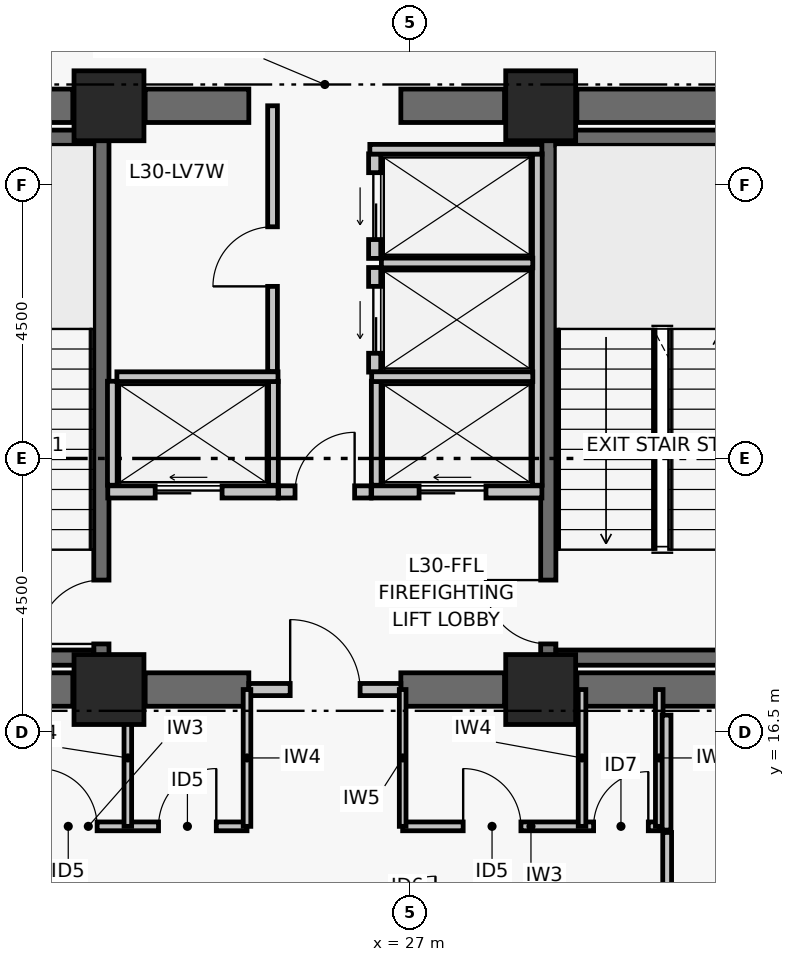
"""IFC4 building model, lengths in metres.
Left out: names, types, materials, properties, quantities, classifications, styles, units other than length and angle.
Written with IfcOpenShell. Run it as: python <this file> out.ifc"""

import sys

from ifc_helpers import new_model, si_unit, direction, frame, frame_2d, origin, origin_2d, place, context, subcontext, project, spatial, rectangle, extrude, element, fill, save


model = new_model("IFC4")
c1 = context("Model", 3, precision=1e-05, world=origin(), true_north=direction((0.0, 1.0)))
c2 = subcontext(c1, "Body", "Model", "MODEL_VIEW")
j1 = project(units=[si_unit("LENGTHUNIT", "METRE"), si_unit("PLANEANGLEUNIT", "RADIAN")], contexts=[c1])
p1 = place(None, origin())
s1 = spatial("IfcSite", under=j1, at=p1, CompositionType="ELEMENT")
p2 = place(p1, origin())
s2 = spatial("IfcBuilding", under=s1, at=p2, CompositionType="ELEMENT")
p3 = place(p2, frame((0.0, 0.0, 122.58)))
s3 = spatial("IfcBuildingStorey", under=s2, at=p3, CompositionType="ELEMENT", Elevation=122.58)
for number, where, z_axis, x_axis in (
    (1, (22.05, 17.2, 0.0), (0.0, 0.0, 1.0), (1.0, 0.0, 0.0)),
    (2, (29.15, 17.2, 0.0), (0.0, 0.0, 1.0), (1.0, 0.0, 0.0)),
    (3, (22.05, 26.8, 0.0), (0.0, 0.0, 1.0), (1.0, 0.0, 0.0)),
    (4, (29.15, 26.8, 0.0), (0.0, 0.0, 1.0), (1.0, 0.0, 0.0)),
):
    element("IfcColumn", number, at=place(p3, frame(where, z_axis=z_axis, x_axis=x_axis)), inside=s3, PredefinedType="COLUMN", context=c2, shape_type="SweptSolid", body=[
        extrude(rectangle(XDim=1.15, YDim=1.15, at=origin_2d()), origin(), (0.0, 0.0, 1.0), 3.72),
    ])
p4 = place(p3, frame((18.395, 17.2, 0.0), z_axis=(0.0, 0.0, 1.0), x_axis=(1.0, 0.0, 0.0)))
e5 = element("IfcWall", 5, at=p4, inside=s3, PredefinedType="SHEAR", context=c2, shape_type="SweptSolid", body=[
    extrude(rectangle(XDim=3.06, YDim=0.55, at=frame_2d((1.53, 0.0))), origin(), (0.0, 0.0, 1.0), 3.47),
])
p5 = place(p3, frame((22.645, 17.2, 0.0), z_axis=(0.0, 0.0, 1.0), x_axis=(1.0, 0.0, 0.0)))
e6 = element("IfcWall", 6, at=p5, inside=s3, PredefinedType="SHEAR", context=c2, shape_type="SweptSolid", body=[
    extrude(rectangle(XDim=1.705, YDim=0.55, at=frame_2d((0.853, 0.0))), origin(), (0.0, 0.0, 1.0), 3.47),
])
p6 = place(p3, frame((26.85, 17.2, 0.0), z_axis=(0.0, 0.0, 1.0), x_axis=(1.0, 0.0, 0.0)))
e7 = element("IfcWall", 7, at=p6, inside=s3, PredefinedType="SHEAR", context=c2, shape_type="SweptSolid", body=[
    extrude(rectangle(XDim=1.705, YDim=0.55, at=frame_2d((0.853, 0.0))), origin(), (0.0, 0.0, 1.0), 3.47),
])
p7 = place(p3, frame((29.745, 17.2, 0.0), z_axis=(0.0, 0.0, 1.0), x_axis=(1.0, 0.0, 0.0)))
e8 = element("IfcWall", 8, at=p7, inside=s3, PredefinedType="SHEAR", context=c2, shape_type="SweptSolid", body=[
    extrude(rectangle(XDim=3.06, YDim=0.55, at=frame_2d((1.53, 0.0))), origin(), (0.0, 0.0, 1.0), 3.47),
])
p8 = place(p3, frame((18.395, 26.8, 0.0), z_axis=(0.0, 0.0, 1.0), x_axis=(1.0, 0.0, 0.0)))
e9 = element("IfcWall", 9, at=p8, inside=s3, PredefinedType="SHEAR", context=c2, shape_type="SweptSolid", body=[
    extrude(rectangle(XDim=3.06, YDim=0.55, at=frame_2d((1.53, 0.0))), origin(), (0.0, 0.0, 1.0), 3.47),
])
p9 = place(p3, frame((22.645, 26.8, 0.0), z_axis=(0.0, 0.0, 1.0), x_axis=(1.0, 0.0, 0.0)))
e10 = element("IfcWall", 10, at=p9, inside=s3, PredefinedType="SHEAR", context=c2, shape_type="SweptSolid", body=[
    extrude(rectangle(XDim=1.705, YDim=0.55, at=frame_2d((0.853, 0.0))), origin(), (0.0, 0.0, 1.0), 3.47),
])
p10 = place(p3, frame((26.85, 26.8, 0.0), z_axis=(0.0, 0.0, 1.0), x_axis=(1.0, 0.0, 0.0)))
e11 = element("IfcWall", 11, at=p10, inside=s3, PredefinedType="SHEAR", context=c2, shape_type="SweptSolid", body=[
    extrude(rectangle(XDim=1.705, YDim=0.55, at=frame_2d((0.853, 0.0))), origin(), (0.0, 0.0, 1.0), 3.47),
])
p11 = place(p3, frame((29.745, 26.8, 0.0), z_axis=(0.0, 0.0, 1.0), x_axis=(1.0, 0.0, 0.0)))
e12 = element("IfcWall", 12, at=p11, inside=s3, PredefinedType="SHEAR", context=c2, shape_type="SweptSolid", body=[
    extrude(rectangle(XDim=3.06, YDim=0.55, at=frame_2d((1.53, 0.0))), origin(), (0.0, 0.0, 1.0), 3.47),
])
p12 = place(p3, frame((21.925, 17.6, 0.0), z_axis=(0.0, 0.0, 1.0), x_axis=(0.0, 1.0, 0.0)))
e13 = element("IfcWall", 13, at=p12, inside=s3, PredefinedType="SHEAR", context=c2, shape_type="SweptSolid", body=[
    extrude(rectangle(XDim=8.8, YDim=0.25, at=frame_2d((4.4, 0.0))), origin(), (0.0, 0.0, 1.0), 3.47),
])
p13 = place(p12, frame((0.35, 0.0, 0.0)))
e14 = element("IfcOpeningElement", 14, at=p13, cuts=e13, PredefinedType="OPENING", context=c2, shape_type="SweptSolid", body=[
    extrude(rectangle(XDim=1.05, YDim=2.08, at=frame_2d((0.525, 1.04))), frame((0.0, 0.135, 0.0), z_axis=(0.0, -1.0, 0.0), x_axis=(1.0, 0.0, 0.0)), (0.0, 0.0, 1.0), 0.27),
])
for number, where, z_axis, x_axis in (
    (15, (18.329, 17.725, 0.0), (0.0, 0.0, 1.0), (1.0, 0.0, 0.0)),
    (16, (18.329, 26.275, 0.0), (0.0, 0.0, 1.0), (1.0, 0.0, 0.0)),
):
    element("IfcWall", number, at=place(p3, frame(where, z_axis=z_axis, x_axis=x_axis)), inside=s3, PredefinedType="SHEAR", context=c2, shape_type="SweptSolid", body=[
        extrude(rectangle(XDim=3.471, YDim=0.25, at=frame_2d((1.735, 0.0))), origin(), (0.0, 0.0, 1.0), 3.47),
    ])
p14 = place(p3, frame((29.275, 17.6, 0.0), z_axis=(0.0, 0.0, 1.0), x_axis=(0.0, 1.0, 0.0)))
e17 = element("IfcWall", 17, at=p14, inside=s3, PredefinedType="SHEAR", context=c2, shape_type="SweptSolid", body=[
    extrude(rectangle(XDim=8.8, YDim=0.25, at=frame_2d((4.4, 0.0))), origin(), (0.0, 0.0, 1.0), 3.47),
])
p15 = place(p14, frame((0.35, 0.0, 0.0)))
e18 = element("IfcOpeningElement", 18, at=p15, cuts=e17, PredefinedType="OPENING", context=c2, shape_type="SweptSolid", body=[
    extrude(rectangle(XDim=1.05, YDim=2.08, at=frame_2d((0.525, 1.04))), frame((0.0, 0.135, 0.0), z_axis=(0.0, -1.0, 0.0), x_axis=(1.0, 0.0, 0.0)), (0.0, 0.0, 1.0), 0.27),
])
for number, where, z_axis, x_axis in (
    (19, (29.4, 17.725, 0.0), (0.0, 0.0, 1.0), (1.0, 0.0, 0.0)),
    (20, (29.4, 26.275, 0.0), (0.0, 0.0, 1.0), (1.0, 0.0, 0.0)),
):
    element("IfcWall", number, at=place(p3, frame(where, z_axis=z_axis, x_axis=x_axis)), inside=s3, PredefinedType="SHEAR", context=c2, shape_type="SweptSolid", body=[
        extrude(rectangle(XDim=3.471, YDim=0.25, at=frame_2d((1.736, 0.0))), origin(), (0.0, 0.0, 1.0), 3.47),
    ])
p16 = place(p3, frame((24.35, 17.2, 0.0), z_axis=(0.0, 0.0, 1.0), x_axis=(1.0, 0.0, 0.0)))
e21 = element("IfcWall", 21, at=p16, inside=s3, PredefinedType="PARTITIONING", context=c2, shape_type="SweptSolid", body=[
    extrude(rectangle(XDim=2.5, YDim=0.2, at=frame_2d((1.25, 0.0))), origin(), (0.0, 0.0, 1.0), 2.6),
])
p17 = place(p16, frame((0.68, 0.0, 0.0)))
e22 = element("IfcOpeningElement", 22, at=p17, cuts=e21, PredefinedType="OPENING", context=c2, shape_type="SweptSolid", body=[
    extrude(rectangle(XDim=1.15, YDim=2.08, at=frame_2d((0.575, 1.04))), frame((0.0, 0.11, 0.0), z_axis=(0.0, -1.0, 0.0), x_axis=(1.0, 0.0, 0.0)), (0.0, 0.0, 1.0), 0.22),
])
p18 = place(p3, frame((24.84, 20.45, 0.0), z_axis=(0.0, 0.0, 1.0), x_axis=(1.0, 0.0, 0.0)))
e23 = element("IfcWall", 23, at=p18, inside=s3, PredefinedType="PARTITIONING", context=c2, shape_type="SweptSolid", body=[
    extrude(rectangle(XDim=1.52, YDim=0.2, at=frame_2d((0.76, 0.0))), origin(), (0.0, 0.0, 1.0), 3.47),
])
p19 = place(p18, frame((0.27, 0.0, 0.0)))
e24 = element("IfcOpeningElement", 24, at=p19, cuts=e23, PredefinedType="OPENING", context=c2, shape_type="SweptSolid", body=[
    extrude(rectangle(XDim=0.98, YDim=2.06, at=frame_2d((0.49, 1.03))), frame((0.0, 0.11, 0.0), z_axis=(0.0, -1.0, 0.0), x_axis=(1.0, 0.0, 0.0)), (0.0, 0.0, 1.0), 0.22),
])
p20 = place(p3, frame((22.03, 20.45, 0.0), z_axis=(0.0, 0.0, 1.0), x_axis=(1.0, 0.0, 0.0)))
e25 = element("IfcWall", 25, at=p20, inside=s3, PredefinedType="PARTITIONING", context=c2, shape_type="SweptSolid", body=[
    extrude(rectangle(XDim=2.8, YDim=0.2, at=frame_2d((1.4, 0.0))), origin(), (0.0, 0.0, 1.0), 3.47),
])
p21 = place(p20, frame((0.78, 0.0, 0.0)))
e26 = element("IfcOpeningElement", 26, at=p21, cuts=e25, PredefinedType="OPENING", context=c2, shape_type="SweptSolid", body=[
    extrude(rectangle(XDim=1.1, YDim=2.08, at=frame_2d((0.55, 1.04))), frame((0.0, 0.11, 0.0), z_axis=(0.0, -1.0, 0.0), x_axis=(1.0, 0.0, 0.0)), (0.0, 0.0, 1.0), 0.22),
])
p22 = place(p3, frame((26.37, 20.45, 0.0), z_axis=(0.0, 0.0, 1.0), x_axis=(1.0, 0.0, 0.0)))
e27 = element("IfcWall", 27, at=p22, inside=s3, PredefinedType="PARTITIONING", context=c2, shape_type="SweptSolid", body=[
    extrude(rectangle(XDim=2.8, YDim=0.2, at=frame_2d((1.4, 0.0))), origin(), (0.0, 0.0, 1.0), 3.47),
])
p23 = place(p22, frame((0.78, 0.0, 0.0)))
e28 = element("IfcOpeningElement", 28, at=p23, cuts=e27, PredefinedType="OPENING", context=c2, shape_type="SweptSolid", body=[
    extrude(rectangle(XDim=1.1, YDim=2.08, at=frame_2d((0.55, 1.04))), frame((0.0, 0.11, 0.0), z_axis=(0.0, -1.0, 0.0), x_axis=(1.0, 0.0, 0.0)), (0.0, 0.0, 1.0), 0.22),
])
p24 = place(p3, frame((26.42, 22.42, 0.0), z_axis=(0.0, 0.0, 1.0), x_axis=(0.0, 1.0, 0.0)))
e29 = element("IfcWall", 29, at=p24, inside=s3, PredefinedType="PARTITIONING", context=c2, shape_type="SweptSolid", body=[
    extrude(rectangle(XDim=1.72, YDim=0.2, at=frame_2d((0.86, 0.0))), origin(), (0.0, 0.0, 1.0), 3.47),
])
p25 = place(p24, frame((0.31, 0.0, 0.0)))
e30 = element("IfcOpeningElement", 30, at=p25, cuts=e29, PredefinedType="OPENING", context=c2, shape_type="SweptSolid", body=[
    extrude(rectangle(XDim=1.1, YDim=2.08, at=frame_2d((0.55, 1.04))), frame((0.0, 0.11, 0.0), z_axis=(0.0, -1.0, 0.0), x_axis=(1.0, 0.0, 0.0)), (0.0, 0.0, 1.0), 0.22),
])
p26 = place(p3, frame((26.42, 24.29, 0.0), z_axis=(0.0, 0.0, 1.0), x_axis=(0.0, 1.0, 0.0)))
e31 = element("IfcWall", 31, at=p26, inside=s3, PredefinedType="PARTITIONING", context=c2, shape_type="SweptSolid", body=[
    extrude(rectangle(XDim=1.72, YDim=0.2, at=frame_2d((0.86, 0.0))), origin(), (0.0, 0.0, 1.0), 3.47),
])
p27 = place(p26, frame((0.31, 0.0, 0.0)))
e32 = element("IfcOpeningElement", 32, at=p27, cuts=e31, PredefinedType="OPENING", context=c2, shape_type="SweptSolid", body=[
    extrude(rectangle(XDim=1.1, YDim=2.08, at=frame_2d((0.55, 1.04))), frame((0.0, 0.11, 0.0), z_axis=(0.0, -1.0, 0.0), x_axis=(1.0, 0.0, 0.0)), (0.0, 0.0, 1.0), 0.22),
])
for number, where, z_axis, x_axis in (
    (33, (22.105, 20.56, 0.0), (0.0, 0.0, 1.0), (0.0, 1.0, 0.0)),
    (34, (24.755, 20.56, 0.0), (0.0, 0.0, 1.0), (0.0, 1.0, 0.0)),
):
    element("IfcWall", number, at=place(p3, frame(where, z_axis=z_axis, x_axis=x_axis)), inside=s3, PredefinedType="PARTITIONING", context=c2, shape_type="SweptSolid", body=[
        extrude(rectangle(XDim=1.71, YDim=0.16, at=frame_2d((0.855, 0.0))), origin(), (0.0, 0.0, 1.0), 3.47),
    ])
p28 = place(p3, frame((22.18, 22.345, 0.0), z_axis=(0.0, 0.0, 1.0), x_axis=(1.0, 0.0, 0.0)))
e35 = element("IfcWall", 35, at=p28, inside=s3, PredefinedType="PARTITIONING", context=c2, shape_type="SweptSolid", body=[
    extrude(rectangle(XDim=2.65, YDim=0.16, at=frame_2d((1.325, 0.0))), origin(), (0.0, 0.0, 1.0), 3.47),
])
p29 = place(p3, frame((29.095, 20.56, 0.0), z_axis=(0.0, 0.0, 1.0), x_axis=(0.0, 1.0, 0.0)))
e36 = element("IfcWall", 36, at=p29, inside=s3, PredefinedType="PARTITIONING", context=c2, shape_type="SweptSolid", body=[
    extrude(rectangle(XDim=5.45, YDim=0.16, at=frame_2d((2.725, 0.0))), origin(), (0.0, 0.0, 1.0), 3.47),
])
p30 = place(p3, frame((26.445, 20.56, 0.0), z_axis=(0.0, 0.0, 1.0), x_axis=(0.0, 1.0, 0.0)))
e37 = element("IfcWall", 37, at=p30, inside=s3, PredefinedType="PARTITIONING", context=c2, shape_type="SweptSolid", body=[
    extrude(rectangle(XDim=1.71, YDim=0.16, at=frame_2d((0.855, 0.0))), origin(), (0.0, 0.0, 1.0), 3.47),
])
p31 = place(p3, frame((26.37, 22.345, 0.0), z_axis=(0.0, 0.0, 1.0), x_axis=(1.0, 0.0, 0.0)))
e38 = element("IfcWall", 38, at=p31, inside=s3, PredefinedType="PARTITIONING", context=c2, shape_type="SweptSolid", body=[
    extrude(rectangle(XDim=2.65, YDim=0.16, at=frame_2d((1.325, 0.0))), origin(), (0.0, 0.0, 1.0), 3.47),
])
p32 = place(p3, frame((26.53, 24.215, 0.0), z_axis=(0.0, 0.0, 1.0), x_axis=(1.0, 0.0, 0.0)))
e39 = element("IfcWall", 39, at=p32, inside=s3, PredefinedType="PARTITIONING", context=c2, shape_type="SweptSolid", body=[
    extrude(rectangle(XDim=2.49, YDim=0.16, at=frame_2d((1.245, 0.0))), origin(), (0.0, 0.0, 1.0), 3.47),
])
p33 = place(p3, frame((26.34, 26.085, 0.0), z_axis=(0.0, 0.0, 1.0), x_axis=(1.0, 0.0, 0.0)))
e40 = element("IfcWall", 40, at=p33, inside=s3, PredefinedType="PARTITIONING", context=c2, shape_type="SweptSolid", body=[
    extrude(rectangle(XDim=2.83, YDim=0.16, at=frame_2d((1.415, 0.0))), origin(), (0.0, 0.0, 1.0), 3.47),
])
p34 = place(p3, frame((24.74, 22.43, 0.0), z_axis=(0.0, 0.0, 1.0), x_axis=(0.0, 1.0, 0.0)))
e41 = element("IfcWall", 41, at=p34, inside=s3, PredefinedType="PARTITIONING", context=c2, shape_type="SweptSolid", body=[
    extrude(rectangle(XDim=4.37, YDim=0.16, at=frame_2d((2.185, 0.0))), origin(), (0.0, 0.0, 1.0), 2.6),
])
p35 = place(p34, frame((1.4, 0.0, 0.0)))
e42 = element("IfcOpeningElement", 42, at=p35, cuts=e41, PredefinedType="OPENING", context=c2, shape_type="SweptSolid", body=[
    extrude(rectangle(XDim=0.98, YDim=2.06, at=frame_2d((0.49, 1.03))), frame((0.0, 0.09, 0.0), z_axis=(0.0, -1.0, 0.0), x_axis=(1.0, 0.0, 0.0)), (0.0, 0.0, 1.0), 0.18),
])
p36 = place(p3, frame((19.1, 14.95, 0.0), z_axis=(0.0, 0.0, 1.0), x_axis=(1.0, 0.0, 0.0)))
e43 = element("IfcWall", 43, at=p36, inside=s3, PredefinedType="PARTITIONING", context=c2, shape_type="SweptSolid", body=[
    extrude(rectangle(XDim=5.22, YDim=0.145, at=frame_2d((2.61, 0.0))), origin(), (0.0, 0.0, 1.0), 2.65),
])
p37 = place(p36, frame((0.2, 0.0, 0.0)))
e44 = element("IfcOpeningElement", 44, at=p37, cuts=e43, PredefinedType="OPENING", context=c2, shape_type="SweptSolid", body=[
    extrude(rectangle(XDim=0.9, YDim=2.02, at=frame_2d((0.45, 1.01))), frame((0.0, 0.083, 0.0), z_axis=(0.0, -1.0, 0.0), x_axis=(1.0, 0.0, 0.0)), (0.0, 0.0, 1.0), 0.165),
])
p38 = place(p36, frame((1.805, 0.0, 0.0)))
e45 = element("IfcOpeningElement", 45, at=p38, cuts=e43, PredefinedType="OPENING", context=c2, shape_type="SweptSolid", body=[
    extrude(rectangle(XDim=0.95, YDim=2.06, at=frame_2d((0.475, 1.03))), frame((0.0, 0.083, 0.0), z_axis=(0.0, -1.0, 0.0), x_axis=(1.0, 0.0, 0.0)), (0.0, 0.0, 1.0), 0.165),
])
p39 = place(p36, frame((3.765, 0.0, 0.0)))
e46 = element("IfcOpeningElement", 46, at=p39, cuts=e43, PredefinedType="OPENING", context=c2, shape_type="SweptSolid", body=[
    extrude(rectangle(XDim=0.95, YDim=2.06, at=frame_2d((0.475, 1.03))), frame((0.0, 0.083, 0.0), z_axis=(0.0, -1.0, 0.0), x_axis=(1.0, 0.0, 0.0)), (0.0, 0.0, 1.0), 0.165),
])
p40 = place(p3, frame((26.88, 14.95, 0.0), z_axis=(0.0, 0.0, 1.0), x_axis=(1.0, 0.0, 0.0)))
e47 = element("IfcWall", 47, at=p40, inside=s3, PredefinedType="PARTITIONING", context=c2, shape_type="SweptSolid", body=[
    extrude(rectangle(XDim=4.22, YDim=0.145, at=frame_2d((2.11, 0.0))), origin(), (0.0, 0.0, 1.0), 3.05),
])
p41 = place(p40, frame((0.995, 0.0, 0.0)))
e48 = element("IfcOpeningElement", 48, at=p41, cuts=e47, PredefinedType="OPENING", context=c2, shape_type="SweptSolid", body=[
    extrude(rectangle(XDim=0.95, YDim=2.06, at=frame_2d((0.475, 1.03))), frame((0.0, 0.083, 0.0), z_axis=(0.0, -1.0, 0.0), x_axis=(1.0, 0.0, 0.0)), (0.0, 0.0, 1.0), 0.165),
])
p42 = place(p40, frame((3.14, 0.0, 0.0)))
e49 = element("IfcOpeningElement", 49, at=p42, cuts=e47, PredefinedType="OPENING", context=c2, shape_type="SweptSolid", body=[
    extrude(rectangle(XDim=0.9, YDim=2.02, at=frame_2d((0.45, 1.01))), frame((0.0, 0.083, 0.0), z_axis=(0.0, -1.0, 0.0), x_axis=(1.0, 0.0, 0.0)), (0.0, 0.0, 1.0), 0.165),
])
for number, where, z_axis, x_axis in (
    (50, (22.36, 14.95, 0.0), (0.0, 0.0, 1.0), (0.0, 1.0, 0.0)),
    (51, (24.32, 14.95, 0.0), (0.0, 0.0, 1.0), (0.0, 1.0, 0.0)),
):
    element("IfcWall", number, at=place(p3, frame(where, z_axis=z_axis, x_axis=x_axis)), inside=s3, PredefinedType="PARTITIONING", context=c2, shape_type="SweptSolid", body=[
        extrude(rectangle(XDim=2.25, YDim=0.125, at=frame_2d((1.125, 0.0))), origin(), (0.0, 0.0, 1.0), 2.6),
    ])
p43 = place(p3, frame((26.88, 14.95, 0.0), z_axis=(0.0, 0.0, 1.0), x_axis=(0.0, 1.0, 0.0)))
e52 = element("IfcWall", 52, at=p43, inside=s3, PredefinedType="PARTITIONING", context=c2, shape_type="SweptSolid", body=[
    extrude(rectangle(XDim=2.25, YDim=0.11, at=frame_2d((1.125, 0.0))), origin(), (0.0, 0.0, 1.0), 2.6),
])
for number, where, z_axis, x_axis in (
    (53, (29.83, 14.95, 0.0), (0.0, 0.0, 1.0), (0.0, 1.0, 0.0)),
    (54, (31.1, 14.95, 0.0), (0.0, 0.0, 1.0), (0.0, 1.0, 0.0)),
):
    element("IfcWall", number, at=place(p3, frame(where, z_axis=z_axis, x_axis=x_axis)), inside=s3, PredefinedType="PARTITIONING", context=c2, shape_type="SweptSolid", body=[
        extrude(rectangle(XDim=2.25, YDim=0.125, at=frame_2d((1.125, 0.0))), origin(), (0.0, 0.0, 1.0), 2.6),
    ])
p44 = place(p3, frame((31.23, 13.351, 0.0), z_axis=(0.0, 0.0, 1.0), x_axis=(0.0, 1.0, 0.0)))
e55 = element("IfcWall", 55, at=p44, inside=s3, PredefinedType="PARTITIONING", context=c2, shape_type="SweptSolid", body=[
    extrude(rectangle(XDim=1.499, YDim=0.145, at=frame_2d((0.75, 0.0))), origin(), (0.0, 0.0, 1.0), 2.9),
])
p45 = place(p3, frame((31.22, 14.889, 0.0), z_axis=(0.0, 0.0, 1.0), x_axis=(0.0, 1.0, 0.0)))
e56 = element("IfcWall", 56, at=p45, inside=s3, PredefinedType="PARTITIONING", context=c2, shape_type="SweptSolid", body=[
    extrude(rectangle(XDim=1.891, YDim=0.145, at=frame_2d((0.946, 0.0))), origin(), (0.0, 0.0, 1.0), 2.6),
])
p46 = place(p13, origin())
e57 = element("IfcDoor", 57, at=p46, inside=s3, OperationType="SINGLE_SWING_LEFT", PredefinedType="DOOR", context=c2, shape_type="SweptSolid", body=[
    extrude(rectangle(XDim=1.05, YDim=2.08, at=frame_2d((0.525, 1.04))), frame((0.0, 0.025, 0.0), z_axis=(0.0, -1.0, 0.0), x_axis=(1.0, 0.0, 0.0)), (0.0, 0.0, 1.0), 0.05),
])
fill(e14, e57)
p47 = place(p15, origin())
e58 = element("IfcDoor", 58, at=p47, inside=s3, OperationType="SINGLE_SWING_RIGHT", PredefinedType="DOOR", context=c2, shape_type="SweptSolid", body=[
    extrude(rectangle(XDim=1.05, YDim=2.08, at=frame_2d((0.525, 1.04))), frame((0.0, 0.025, 0.0), z_axis=(0.0, -1.0, 0.0), x_axis=(1.0, 0.0, 0.0)), (0.0, 0.0, 1.0), 0.05),
])
fill(e18, e58)
p48 = place(p17, origin())
e59 = element("IfcDoor", 59, at=p48, inside=s3, OperationType="SINGLE_SWING_LEFT", PredefinedType="DOOR", context=c2, shape_type="SweptSolid", body=[
    extrude(rectangle(XDim=1.15, YDim=2.08, at=frame_2d((0.575, 1.04))), frame((0.0, 0.025, 0.0), z_axis=(0.0, -1.0, 0.0), x_axis=(1.0, 0.0, 0.0)), (0.0, 0.0, 1.0), 0.05),
])
fill(e22, e59)
p49 = place(p19, origin())
e60 = element("IfcDoor", 60, at=p49, inside=s3, OperationType="SINGLE_SWING_RIGHT", PredefinedType="DOOR", context=c2, shape_type="SweptSolid", body=[
    extrude(rectangle(XDim=0.98, YDim=2.06, at=frame_2d((0.49, 1.03))), frame((0.0, 0.025, 0.0), z_axis=(0.0, -1.0, 0.0), x_axis=(1.0, 0.0, 0.0)), (0.0, 0.0, 1.0), 0.05),
])
fill(e24, e60)
p50 = place(p21, origin())
e61 = element("IfcDoor", 61, at=p50, inside=s3, OperationType="DOUBLE_DOOR_SLIDING", PredefinedType="DOOR", context=c2, shape_type="SweptSolid", body=[
    extrude(rectangle(XDim=1.1, YDim=2.08, at=frame_2d((0.55, 1.04))), frame((0.0, 0.025, 0.0), z_axis=(0.0, -1.0, 0.0), x_axis=(1.0, 0.0, 0.0)), (0.0, 0.0, 1.0), 0.05),
])
fill(e26, e61)
p51 = place(p23, origin())
e62 = element("IfcDoor", 62, at=p51, inside=s3, OperationType="DOUBLE_DOOR_SLIDING", PredefinedType="DOOR", context=c2, shape_type="SweptSolid", body=[
    extrude(rectangle(XDim=1.1, YDim=2.08, at=frame_2d((0.55, 1.04))), frame((0.0, 0.025, 0.0), z_axis=(0.0, -1.0, 0.0), x_axis=(1.0, 0.0, 0.0)), (0.0, 0.0, 1.0), 0.05),
])
fill(e28, e62)
p52 = place(p25, origin())
e63 = element("IfcDoor", 63, at=p52, inside=s3, OperationType="DOUBLE_DOOR_SLIDING", PredefinedType="DOOR", context=c2, shape_type="SweptSolid", body=[
    extrude(rectangle(XDim=1.1, YDim=2.08, at=frame_2d((0.55, 1.04))), frame((0.0, 0.025, 0.0), z_axis=(0.0, -1.0, 0.0), x_axis=(1.0, 0.0, 0.0)), (0.0, 0.0, 1.0), 0.05),
])
fill(e30, e63)
p53 = place(p27, origin())
e64 = element("IfcDoor", 64, at=p53, inside=s3, OperationType="DOUBLE_DOOR_SLIDING", PredefinedType="DOOR", context=c2, shape_type="SweptSolid", body=[
    extrude(rectangle(XDim=1.1, YDim=2.08, at=frame_2d((0.55, 1.04))), frame((0.0, 0.025, 0.0), z_axis=(0.0, -1.0, 0.0), x_axis=(1.0, 0.0, 0.0)), (0.0, 0.0, 1.0), 0.05),
])
fill(e32, e64)
p54 = place(p35, origin())
e65 = element("IfcDoor", 65, at=p54, inside=s3, OperationType="SINGLE_SWING_LEFT", PredefinedType="DOOR", context=c2, shape_type="SweptSolid", body=[
    extrude(rectangle(XDim=0.98, YDim=2.06, at=frame_2d((0.49, 1.03))), frame((0.0, 0.025, 0.0), z_axis=(0.0, -1.0, 0.0), x_axis=(1.0, 0.0, 0.0)), (0.0, 0.0, 1.0), 0.05),
])
fill(e42, e65)
p55 = place(p38, origin())
e66 = element("IfcDoor", 66, at=p55, inside=s3, OperationType="SINGLE_SWING_LEFT", PredefinedType="DOOR", context=c2, shape_type="SweptSolid", body=[
    extrude(rectangle(XDim=0.95, YDim=2.06, at=frame_2d((0.475, 1.03))), frame((0.0, 0.025, 0.0), z_axis=(0.0, -1.0, 0.0), x_axis=(1.0, 0.0, 0.0)), (0.0, 0.0, 1.0), 0.05),
])
fill(e45, e66)
p56 = place(p39, origin())
e67 = element("IfcDoor", 67, at=p56, inside=s3, OperationType="SINGLE_SWING_RIGHT", PredefinedType="DOOR", context=c2, shape_type="SweptSolid", body=[
    extrude(rectangle(XDim=0.95, YDim=2.06, at=frame_2d((0.475, 1.03))), frame((0.0, 0.025, 0.0), z_axis=(0.0, -1.0, 0.0), x_axis=(1.0, 0.0, 0.0)), (0.0, 0.0, 1.0), 0.05),
])
fill(e46, e67)
p57 = place(p41, origin())
e68 = element("IfcDoor", 68, at=p57, inside=s3, OperationType="SINGLE_SWING_LEFT", PredefinedType="DOOR", context=c2, shape_type="SweptSolid", body=[
    extrude(rectangle(XDim=0.95, YDim=2.06, at=frame_2d((0.475, 1.03))), frame((0.0, 0.025, 0.0), z_axis=(0.0, -1.0, 0.0), x_axis=(1.0, 0.0, 0.0)), (0.0, 0.0, 1.0), 0.05),
])
fill(e48, e68)
p58 = place(p42, origin())
e69 = element("IfcDoor", 69, at=p58, inside=s3, OperationType="SINGLE_SWING_RIGHT", PredefinedType="DOOR", context=c2, shape_type="SweptSolid", body=[
    extrude(rectangle(XDim=0.9, YDim=2.02, at=frame_2d((0.45, 1.01))), frame((0.0, 0.025, 0.0), z_axis=(0.0, -1.0, 0.0), x_axis=(1.0, 0.0, 0.0)), (0.0, 0.0, 1.0), 0.05),
])
fill(e49, e69)
save(model, sys.argv[1])
